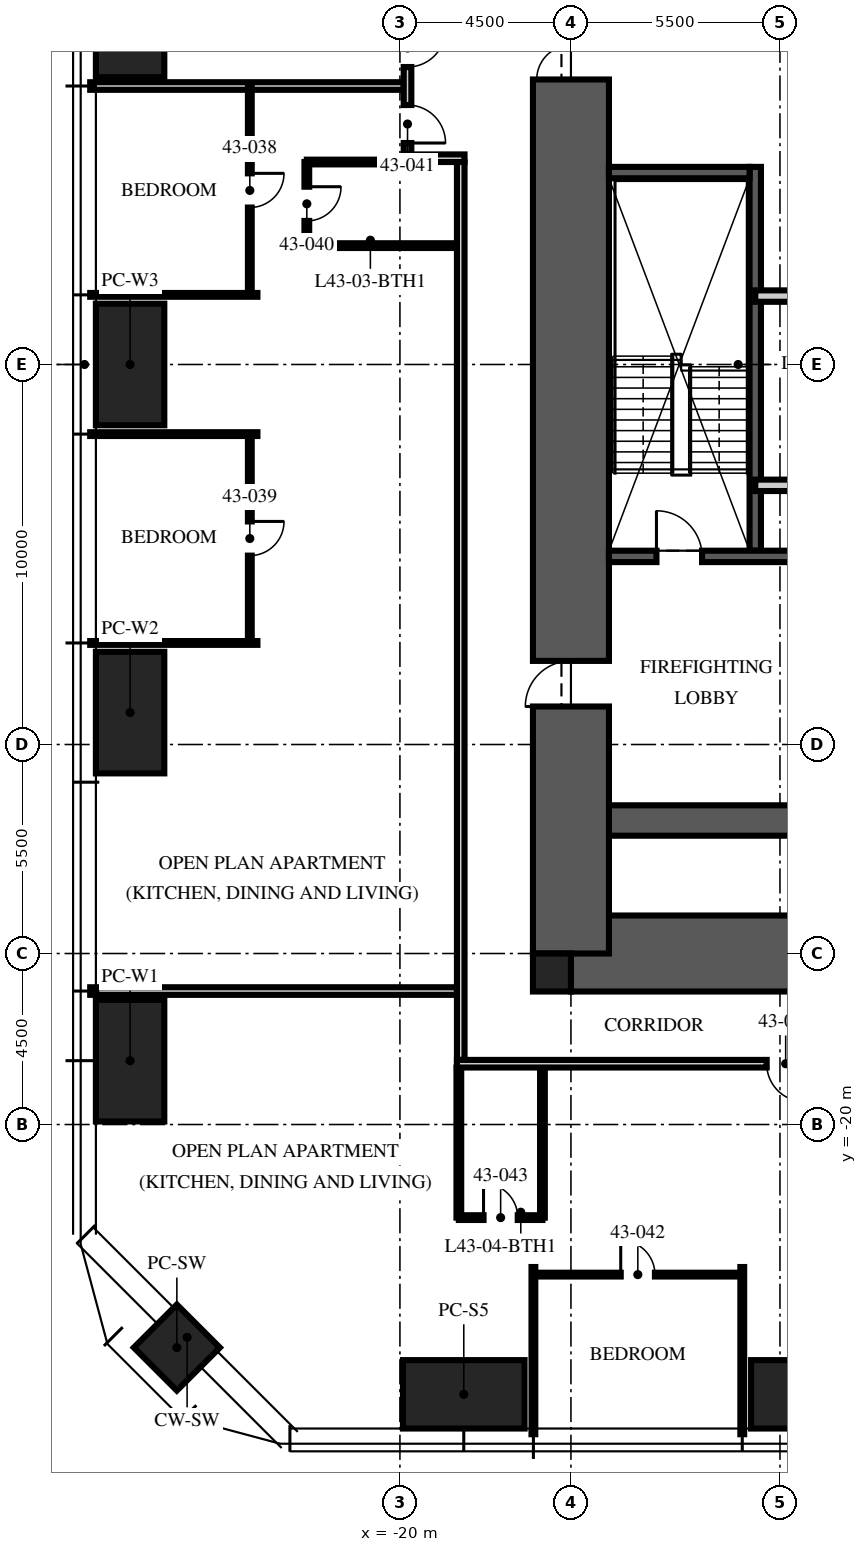
"""IFC4 building model, lengths in metres.
Left out: names, types, materials, properties, quantities, classifications, styles, units other than length and angle.
Written with IfcOpenShell. Run it as: python <this file> out.ifc"""

import sys

from ifc_helpers import new_model, si_unit, direction, frame, frame_2d, origin, origin_2d, place, context, subcontext, project, spatial, rectangle, hollow_rectangle, extrude, element, fill, save


model = new_model("IFC4")
c1 = context("Model", 3, precision=1e-05, world=origin(), true_north=direction((0.0, 1.0)))
c2 = subcontext(c1, "Body", "Model", "MODEL_VIEW")
j1 = project(units=[si_unit("LENGTHUNIT", "METRE"), si_unit("PLANEANGLEUNIT", "RADIAN")], contexts=[c1])
p1 = place(None, origin())
s1 = spatial("IfcSite", under=j1, at=p1, CompositionType="ELEMENT")
p2 = place(p1, origin())
s2 = spatial("IfcBuilding", under=s1, at=p2, CompositionType="ELEMENT")
p3 = place(p2, frame((0.0, 0.0, 171.0)))
s3 = spatial("IfcBuildingStorey", under=s2, at=p3, CompositionType="ELEMENT", Elevation=171.0)
p4 = place(p3, frame((-15.5, -15.5, -0.25), z_axis=(0.0, 0.0, 1.0), x_axis=(1.0, 0.0, 0.0)))
e1 = element("IfcWall", 1, at=p4, inside=s3, PredefinedType="SHEAR", context=c2, shape_type="SweptSolid", body=[
    extrude(rectangle(XDim=31.0, YDim=2.0, at=frame_2d((15.5, 0.0))), origin(), (0.0, 0.0, 1.0), 3.75),
])
p5 = place(p4, frame((10.4, 0.0, 0.25)))
e2 = element("IfcOpeningElement", 2, at=p5, cuts=e1, PredefinedType="OPENING", context=c2, shape_type="SweptSolid", body=[
    extrude(rectangle(XDim=1.1, YDim=2.1, at=frame_2d((0.55, 1.05))), frame((0.0, 1.01, 0.0), z_axis=(0.0, -1.0, 0.0), x_axis=(1.0, 0.0, 0.0)), (0.0, 0.0, 1.0), 2.02),
])
p6 = place(p4, frame((13.5, 0.0, 0.25)))
e3 = element("IfcOpeningElement", 3, at=p6, cuts=e1, PredefinedType="OPENING", context=c2, shape_type="SweptSolid", body=[
    extrude(rectangle(XDim=1.1, YDim=2.1, at=frame_2d((0.55, 1.05))), frame((0.0, 1.01, 0.0), z_axis=(0.0, -1.0, 0.0), x_axis=(1.0, 0.0, 0.0)), (0.0, 0.0, 1.0), 2.02),
])
p7 = place(p4, frame((16.6, 0.0, 0.25)))
e4 = element("IfcOpeningElement", 4, at=p7, cuts=e1, PredefinedType="OPENING", context=c2, shape_type="SweptSolid", body=[
    extrude(rectangle(XDim=1.1, YDim=2.1, at=frame_2d((0.55, 1.05))), frame((0.0, 1.01, 0.0), z_axis=(0.0, -1.0, 0.0), x_axis=(1.0, 0.0, 0.0)), (0.0, 0.0, 1.0), 2.02),
])
p8 = place(p3, frame((-15.5, -12.0, -0.25), z_axis=(0.0, 0.0, 1.0), x_axis=(1.0, 0.0, 0.0)))
e5 = element("IfcWall", 5, at=p8, inside=s3, PredefinedType="SHEAR", context=c2, shape_type="SweptSolid", body=[
    extrude(rectangle(XDim=31.0, YDim=0.8, at=frame_2d((15.5, 0.0))), origin(), (0.0, 0.0, 1.0), 3.75),
])
p9 = place(p3, frame((-15.5, -15.5, -0.25), z_axis=(0.0, 0.0, 1.0), x_axis=(0.0, 1.0, 0.0)))
e6 = element("IfcWall", 6, at=p9, inside=s3, PredefinedType="SHEAR", context=c2, shape_type="SweptSolid", body=[
    extrude(rectangle(XDim=31.0, YDim=2.0, at=frame_2d((15.5, 0.0))), origin(), (0.0, 0.0, 1.0), 3.75),
])
p10 = place(p9, frame((6.5, 0.0, 0.25)))
e7 = element("IfcOpeningElement", 7, at=p10, cuts=e6, PredefinedType="OPENING", context=c2, shape_type="SweptSolid", body=[
    extrude(rectangle(XDim=1.2, YDim=2.1, at=frame_2d((0.6, 1.05))), frame((0.0, 1.01, 0.0), z_axis=(0.0, -1.0, 0.0), x_axis=(1.0, 0.0, 0.0)), (0.0, 0.0, 1.0), 2.02),
])
p11 = place(p9, frame((23.0, 0.0, 0.25)))
e8 = element("IfcOpeningElement", 8, at=p11, cuts=e6, PredefinedType="OPENING", context=c2, shape_type="SweptSolid", body=[
    extrude(rectangle(XDim=1.8, YDim=2.1, at=frame_2d((0.9, 1.05))), frame((0.0, 1.01, 0.0), z_axis=(0.0, -1.0, 0.0), x_axis=(1.0, 0.0, 0.0)), (0.0, 0.0, 1.0), 2.02),
])
p12 = place(p3, frame((-16.0, -16.0, -0.25), z_axis=(0.0, 0.0, 1.0), x_axis=(1.0, 0.0, 0.0)))
e9 = element("IfcColumn", 9, at=p12, inside=s3, PredefinedType="COLUMN", context=c2, shape_type="SweptSolid", body=[
    extrude(rectangle(XDim=1.0, YDim=1.0, at=origin_2d()), origin(), (0.0, 0.0, 1.0), 3.75),
])
for number, where, z_axis, x_axis in (
    (10, (-9.16, -27.1, 0.0), (0.0, 0.0, 1.0), (1.0, 0.0, 0.0)),
    (11, (-18.32, -27.1, 0.0), (0.0, 0.0, 1.0), (1.0, 0.0, 0.0)),
    (12, (-27.1, -18.32, 0.0), (0.0, 0.0, 1.0), (0.0, 1.0, 0.0)),
    (13, (-27.1, -9.16, 0.0), (0.0, 0.0, 1.0), (0.0, 1.0, 0.0)),
    (14, (-27.1, 0.0, 0.0), (0.0, 0.0, 1.0), (0.0, 1.0, 0.0)),
    (15, (-27.1, 9.16, 0.0), (0.0, 0.0, 1.0), (0.0, 1.0, 0.0)),
):
    element("IfcColumn", number, at=place(p3, frame(where, z_axis=z_axis, x_axis=x_axis)), inside=s3, PredefinedType="COLUMN", context=c2, shape_type="SweptSolid", body=[
        extrude(hollow_rectangle(XDim=3.2, YDim=1.8, WallThickness=0.2, at=origin_2d()), origin(), (0.0, 0.0, 1.0), 3.75),
    ])
p13 = place(p3, frame((-25.87, -25.87, 0.0), z_axis=(0.0, 0.0, 1.0), x_axis=(0.707106781187, -0.707106781187, 0.0)))
e16 = element("IfcColumn", 16, at=p13, inside=s3, PredefinedType="COLUMN", context=c2, shape_type="SweptSolid", body=[
    extrude(hollow_rectangle(XDim=1.6, YDim=1.6, WallThickness=0.1, at=origin_2d()), origin(), (0.0, 0.0, 1.0), 3.75),
])
p14 = place(p3, frame((-10.65, -4.9, 0.0), z_axis=(0.0, 0.0, 1.0), x_axis=(0.0, 1.0, 0.0)))
e17 = element("IfcWall", 17, at=p14, inside=s3, PredefinedType="SOLIDWALL", context=c2, shape_type="SweptSolid", body=[
    extrude(rectangle(XDim=10.1, YDim=0.3, at=frame_2d((5.05, 0.0))), origin(), (0.0, 0.0, 1.0), 3.5),
])
p15 = place(p3, frame((-14.5, -5.05, 0.0), z_axis=(0.0, 0.0, 1.0), x_axis=(1.0, 0.0, 0.0)))
e18 = element("IfcWall", 18, at=p15, inside=s3, PredefinedType="SOLIDWALL", context=c2, shape_type="SweptSolid", body=[
    extrude(rectangle(XDim=5.7, YDim=0.3, at=frame_2d((2.85, 0.0))), origin(), (0.0, 0.0, 1.0), 3.5),
])
p16 = place(p15, frame((1.25, 0.0, 0.0)))
e19 = element("IfcOpeningElement", 19, at=p16, cuts=e18, PredefinedType="OPENING", context=c2, shape_type="SweptSolid", body=[
    extrude(rectangle(XDim=1.2, YDim=2.1, at=frame_2d((0.6, 1.05))), frame((0.0, 0.16, 0.0), z_axis=(0.0, -1.0, 0.0), x_axis=(1.0, 0.0, 0.0)), (0.0, 0.0, 1.0), 0.32),
])
p17 = place(p3, frame((-14.5, 5.05, 0.0), z_axis=(0.0, 0.0, 1.0), x_axis=(1.0, 0.0, 0.0)))
e20 = element("IfcWall", 20, at=p17, inside=s3, PredefinedType="SOLIDWALL", context=c2, shape_type="SweptSolid", body=[
    extrude(rectangle(XDim=3.7, YDim=0.3, at=frame_2d((1.85, 0.0))), origin(), (0.0, 0.0, 1.0), 3.5),
])
p18 = place(p3, frame((-10.65, 1.8, 0.0), z_axis=(0.0, 0.0, 1.0), x_axis=(1.0, 0.0, 0.0)))
e21 = element("IfcWall", 21, at=p18, inside=s3, PredefinedType="PARTITIONING", context=c2, shape_type="SweptSolid", body=[
    extrude(rectangle(XDim=21.3, YDim=0.3, at=frame_2d((10.65, 0.0))), origin(), (0.0, 0.0, 1.0), 3.5),
])
p19 = place(p18, frame((10.05, 0.0, 0.0)))
e22 = element("IfcOpeningElement", 22, at=p19, cuts=e21, PredefinedType="OPENING", context=c2, shape_type="SweptSolid", body=[
    extrude(rectangle(XDim=1.2, YDim=2.1, at=frame_2d((0.6, 1.05))), frame((0.0, 0.16, 0.0), z_axis=(0.0, -1.0, 0.0), x_axis=(1.0, 0.0, 0.0)), (0.0, 0.0, 1.0), 0.32),
])
p20 = place(p18, frame((19.238, 0.0, 0.0)))
e23 = element("IfcOpeningElement", 23, at=p20, cuts=e21, PredefinedType="OPENING", context=c2, shape_type="SweptSolid", body=[
    extrude(rectangle(XDim=0.9, YDim=2.1, at=frame_2d((0.45, 1.05))), frame((0.0, 0.16, 0.0), z_axis=(0.0, -1.0, 0.0), x_axis=(1.0, 0.0, 0.0)), (0.0, 0.0, 1.0), 0.32),
])
p21 = place(p3, frame((-10.65, -3.18, 0.0), z_axis=(0.0, 0.0, 1.0), x_axis=(1.0, 0.0, 0.0)))
e24 = element("IfcWall", 24, at=p21, inside=s3, PredefinedType="PARTITIONING", context=c2, shape_type="SweptSolid", body=[
    extrude(rectangle(XDim=6.45, YDim=0.3, at=frame_2d((3.225, 0.0))), origin(), (0.0, 0.0, 1.0), 3.5),
])
p22 = place(p3, frame((-19.9, 7.328, 0.0), z_axis=(0.0, 0.0, 1.0), x_axis=(-1.0, 0.0, 0.0)))
e25 = element("IfcWall", 25, at=p22, inside=s3, PredefinedType="PARTITIONING", context=c2, shape_type="SweptSolid", body=[
    extrude(rectangle(XDim=8.25, YDim=0.2, at=frame_2d((4.125, 0.0))), origin(), (0.0, 0.0, 1.0), 2.81),
])
for number, where, z_axis, x_axis in (
    (26, (-23.75, 1.832, 0.0), (0.0, 0.0, 1.0), (-1.0, 0.0, 0.0)),
    (27, (-23.75, -1.832, 0.0), (0.0, 0.0, 1.0), (-1.0, 0.0, 0.0)),
    (28, (-23.75, -7.328, 0.0), (0.0, 0.0, 1.0), (-1.0, 0.0, 0.0)),
):
    element("IfcWall", number, at=place(p3, frame(where, z_axis=z_axis, x_axis=x_axis)), inside=s3, PredefinedType="PARTITIONING", context=c2, shape_type="SweptSolid", body=[
        extrude(rectangle(XDim=4.4, YDim=0.1, at=frame_2d((2.2, 0.0))), origin(), (0.0, 0.0, 1.0), 2.81),
    ])
p23 = place(p3, frame((-18.5, -16.488, 0.0), z_axis=(0.0, 0.0, 1.0), x_axis=(-1.0, 0.0, 0.0)))
e29 = element("IfcWall", 29, at=p23, inside=s3, PredefinedType="PARTITIONING", context=c2, shape_type="SweptSolid", body=[
    extrude(rectangle(XDim=9.65, YDim=0.2, at=frame_2d((4.825, 0.0))), origin(), (0.0, 0.0, 1.0), 2.81),
])
for number, where, z_axis, x_axis in (
    (30, (-16.488, -23.75, 0.0), (0.0, 0.0, 1.0), (0.0, -1.0, 0.0)),
    (31, (-10.992, -23.75, 0.0), (0.0, 0.0, 1.0), (0.0, -1.0, 0.0)),
):
    element("IfcWall", number, at=place(p3, frame(where, z_axis=z_axis, x_axis=x_axis)), inside=s3, PredefinedType="PARTITIONING", context=c2, shape_type="SweptSolid", body=[
        extrude(rectangle(XDim=4.4, YDim=0.1, at=frame_2d((2.2, 0.0))), origin(), (0.0, 0.0, 1.0), 2.81),
    ])
p24 = place(p3, frame((-23.95, 7.328, 0.0), z_axis=(0.0, 0.0, 1.0), x_axis=(0.0, -1.0, 0.0)))
e32 = element("IfcWall", 32, at=p24, inside=s3, PredefinedType="PARTITIONING", context=c2, shape_type="SweptSolid", body=[
    extrude(rectangle(XDim=5.496, YDim=0.1, at=frame_2d((2.748, 0.0))), origin(), (0.0, 0.0, 1.0), 2.81),
])
p25 = place(p24, frame((2.298, 0.0, 0.0)))
e33 = element("IfcOpeningElement", 33, at=p25, cuts=e32, PredefinedType="OPENING", context=c2, shape_type="SweptSolid", body=[
    extrude(rectangle(XDim=0.9, YDim=2.1, at=frame_2d((0.45, 1.05))), frame((0.0, 0.06, 0.0), z_axis=(0.0, -1.0, 0.0), x_axis=(1.0, 0.0, 0.0)), (0.0, 0.0, 1.0), 0.12),
])
p26 = place(p3, frame((-23.95, -1.832, 0.0), z_axis=(0.0, 0.0, 1.0), x_axis=(0.0, -1.0, 0.0)))
e34 = element("IfcWall", 34, at=p26, inside=s3, PredefinedType="PARTITIONING", context=c2, shape_type="SweptSolid", body=[
    extrude(rectangle(XDim=5.496, YDim=0.1, at=frame_2d((2.748, 0.0))), origin(), (0.0, 0.0, 1.0), 2.81),
])
p27 = place(p26, frame((2.298, 0.0, 0.0)))
e35 = element("IfcOpeningElement", 35, at=p27, cuts=e34, PredefinedType="OPENING", context=c2, shape_type="SweptSolid", body=[
    extrude(rectangle(XDim=0.9, YDim=2.1, at=frame_2d((0.45, 1.05))), frame((0.0, 0.06, 0.0), z_axis=(0.0, -1.0, 0.0), x_axis=(1.0, 0.0, 0.0)), (0.0, 0.0, 1.0), 0.12),
])
p28 = place(p3, frame((-22.45, 5.328, 0.0), z_axis=(0.0, 0.0, 1.0), x_axis=(0.0, -1.0, 0.0)))
e36 = element("IfcWall", 36, at=p28, inside=s3, PredefinedType="PARTITIONING", context=c2, shape_type="SweptSolid", body=[
    extrude(rectangle(XDim=2.2, YDim=0.125, at=frame_2d((1.1, 0.0))), origin(), (0.0, 0.0, 1.0), 2.81),
])
p29 = place(p28, frame((0.65, 0.0, 0.0)))
e37 = element("IfcOpeningElement", 37, at=p29, cuts=e36, PredefinedType="OPENING", context=c2, shape_type="SweptSolid", body=[
    extrude(rectangle(XDim=0.9, YDim=2.1, at=frame_2d((0.45, 1.05))), frame((0.0, 0.073, 0.0), z_axis=(0.0, -1.0, 0.0), x_axis=(1.0, 0.0, 0.0)), (0.0, 0.0, 1.0), 0.145),
])
p30 = place(p3, frame((-19.97, 5.328, 0.0), z_axis=(0.0, 0.0, 1.0), x_axis=(-1.0, 0.0, 0.0)))
e38 = element("IfcWall", 38, at=p30, inside=s3, PredefinedType="PARTITIONING", context=c2, shape_type="SweptSolid", body=[
    extrude(rectangle(XDim=2.48, YDim=0.125, at=frame_2d((1.24, 0.0))), origin(), (0.0, 0.0, 1.0), 3.5),
])
p31 = place(p3, frame((-18.5, 3.128, 0.0), z_axis=(0.0, 0.0, 1.0), x_axis=(-1.0, 0.0, 0.0)))
e39 = element("IfcWall", 39, at=p31, inside=s3, PredefinedType="PARTITIONING", context=c2, shape_type="SweptSolid", body=[
    extrude(rectangle(XDim=3.95, YDim=0.125, at=frame_2d((1.975, 0.0))), origin(), (0.0, 0.0, 1.0), 3.5),
])
p32 = place(p3, frame((-16.488, -23.95, 0.0), z_axis=(0.0, 0.0, 1.0), x_axis=(1.0, 0.0, 0.0)))
e40 = element("IfcWall", 40, at=p32, inside=s3, PredefinedType="PARTITIONING", context=c2, shape_type="SweptSolid", body=[
    extrude(rectangle(XDim=5.496, YDim=0.1, at=frame_2d((2.748, 0.0))), origin(), (0.0, 0.0, 1.0), 2.81),
])
p33 = place(p32, frame((2.298, 0.0, 0.0)))
e41 = element("IfcOpeningElement", 41, at=p33, cuts=e40, PredefinedType="OPENING", context=c2, shape_type="SweptSolid", body=[
    extrude(rectangle(XDim=0.9, YDim=2.1, at=frame_2d((0.45, 1.05))), frame((0.0, 0.06, 0.0), z_axis=(0.0, -1.0, 0.0), x_axis=(1.0, 0.0, 0.0)), (0.0, 0.0, 1.0), 0.12),
])
p34 = place(p3, frame((-18.45, -22.45, 0.0), z_axis=(0.0, 0.0, 1.0), x_axis=(1.0, 0.0, 0.0)))
e42 = element("IfcWall", 42, at=p34, inside=s3, PredefinedType="PARTITIONING", context=c2, shape_type="SweptSolid", body=[
    extrude(rectangle(XDim=2.2, YDim=0.125, at=frame_2d((1.1, 0.0))), origin(), (0.0, 0.0, 1.0), 2.7),
])
p35 = place(p34, frame((0.65, 0.0, 0.0)))
e43 = element("IfcOpeningElement", 43, at=p35, cuts=e42, PredefinedType="OPENING", context=c2, shape_type="SweptSolid", body=[
    extrude(rectangle(XDim=0.9, YDim=2.1, at=frame_2d((0.45, 1.05))), frame((0.0, 0.073, 0.0), z_axis=(0.0, -1.0, 0.0), x_axis=(1.0, 0.0, 0.0)), (0.0, 0.0, 1.0), 0.145),
])
p36 = place(p3, frame((-18.45, -18.5, 0.0), z_axis=(0.0, 0.0, 1.0), x_axis=(0.0, -1.0, 0.0)))
e44 = element("IfcWall", 44, at=p36, inside=s3, PredefinedType="PARTITIONING", context=c2, shape_type="SweptSolid", body=[
    extrude(rectangle(XDim=3.95, YDim=0.125, at=frame_2d((1.975, 0.0))), origin(), (0.0, 0.0, 1.0), 2.3),
])
p37 = place(p3, frame((-16.25, -18.5, 0.0), z_axis=(0.0, 0.0, 1.0), x_axis=(0.0, -1.0, 0.0)))
e45 = element("IfcWall", 45, at=p37, inside=s3, PredefinedType="PARTITIONING", context=c2, shape_type="SweptSolid", body=[
    extrude(rectangle(XDim=3.95, YDim=0.125, at=frame_2d((1.975, 0.0))), origin(), (0.0, 0.0, 1.0), 3.5),
])
p38 = place(p3, frame((-18.3, 5.428, 0.0), z_axis=(0.0, 0.0, 1.0), x_axis=(-1.0, 0.0, 0.0)))
e46 = element("IfcWall", 46, at=p38, inside=s3, PredefinedType="PARTITIONING", context=c2, shape_type="SweptSolid", body=[
    extrude(rectangle(XDim=1.6, YDim=0.2, at=frame_2d((0.8, 0.0))), origin(), (0.0, 0.0, 1.0), 3.5),
])
p39 = place(p3, frame((-19.8, 9.128, 0.0), z_axis=(0.0, 0.0, 1.0), x_axis=(0.0, -1.0, 0.0)))
e47 = element("IfcWall", 47, at=p39, inside=s3, PredefinedType="PARTITIONING", context=c2, shape_type="SweptSolid", body=[
    extrude(rectangle(XDim=3.6, YDim=0.2, at=frame_2d((1.8, 0.0))), origin(), (0.0, 0.0, 1.0), 2.7),
])
p40 = place(p39, frame((0.3, 0.0, 0.0)))
e48 = element("IfcOpeningElement", 48, at=p40, cuts=e47, PredefinedType="OPENING", context=c2, shape_type="SweptSolid", body=[
    extrude(rectangle(XDim=1.0, YDim=2.2, at=frame_2d((0.5, 1.1))), frame((0.0, 0.11, 0.0), z_axis=(0.0, -1.0, 0.0), x_axis=(1.0, 0.0, 0.0)), (0.0, 0.0, 1.0), 0.22),
])
p41 = place(p39, frame((2.3, 0.0, 0.0)))
e49 = element("IfcOpeningElement", 49, at=p41, cuts=e47, PredefinedType="OPENING", context=c2, shape_type="SweptSolid", body=[
    extrude(rectangle(XDim=1.0, YDim=2.2, at=frame_2d((0.5, 1.1))), frame((0.0, 0.11, 0.0), z_axis=(0.0, -1.0, 0.0), x_axis=(1.0, 0.0, 0.0)), (0.0, 0.0, 1.0), 0.22),
])
p42 = place(p3, frame((-18.4, 5.328, 0.0), z_axis=(0.0, 0.0, 1.0), x_axis=(0.0, -1.0, 0.0)))
e50 = element("IfcWall", 50, at=p42, inside=s3, PredefinedType="PARTITIONING", context=c2, shape_type="SweptSolid", body=[
    extrude(rectangle(XDim=23.628, YDim=0.2, at=frame_2d((11.814, 0.0))), origin(), (0.0, 0.0, 1.0), 2.3),
])
p43 = place(p3, frame((-8.6, -18.4, 0.0), z_axis=(0.0, 0.0, 1.0), x_axis=(-1.0, 0.0, 0.0)))
e51 = element("IfcWall", 51, at=p43, inside=s3, PredefinedType="PARTITIONING", context=c2, shape_type="SweptSolid", body=[
    extrude(rectangle(XDim=9.9, YDim=0.2, at=frame_2d((4.95, 0.0))), origin(), (0.0, 0.0, 1.0), 2.3),
])
p44 = place(p43, frame((0.75, 0.0, 0.0)))
e52 = element("IfcOpeningElement", 52, at=p44, cuts=e51, PredefinedType="OPENING", context=c2, shape_type="SweptSolid", body=[
    extrude(rectangle(XDim=1.0, YDim=2.2, at=frame_2d((0.5, 1.1))), frame((0.0, 0.11, 0.0), z_axis=(0.0, -1.0, 0.0), x_axis=(1.0, 0.0, 0.0)), (0.0, 0.0, 1.0), 0.22),
])
p45 = place(p16, origin())
e53 = element("IfcDoor", 53, at=p45, inside=s3, OperationType="SINGLE_SWING_LEFT", PredefinedType="DOOR", context=c2, shape_type="SweptSolid", body=[
    extrude(rectangle(XDim=1.2, YDim=2.1, at=frame_2d((0.6, 1.05))), frame((0.0, 0.025, 0.0), z_axis=(0.0, -1.0, 0.0), x_axis=(1.0, 0.0, 0.0)), (0.0, 0.0, 1.0), 0.05),
])
fill(e19, e53)
p46 = place(p10, origin())
e54 = element("IfcDoor", 54, at=p46, inside=s3, OperationType="SINGLE_SWING_LEFT", PredefinedType="DOOR", context=c2, shape_type="SweptSolid", body=[
    extrude(rectangle(XDim=1.2, YDim=2.1, at=frame_2d((0.6, 1.05))), frame((0.0, 0.025, 0.0), z_axis=(0.0, -1.0, 0.0), x_axis=(1.0, 0.0, 0.0)), (0.0, 0.0, 1.0), 0.05),
])
fill(e7, e54)
p47 = place(p11, origin())
e55 = element("IfcDoor", 55, at=p47, inside=s3, OperationType="DOUBLE_DOOR_SINGLE_SWING", PredefinedType="DOOR", context=c2, shape_type="SweptSolid", body=[
    extrude(rectangle(XDim=1.8, YDim=2.1, at=frame_2d((0.9, 1.05))), frame((0.0, 0.025, 0.0), z_axis=(0.0, -1.0, 0.0), x_axis=(1.0, 0.0, 0.0)), (0.0, 0.0, 1.0), 0.05),
])
fill(e8, e55)
p48 = place(p40, origin())
e56 = element("IfcDoor", 56, at=p48, inside=s3, OperationType="SINGLE_SWING_LEFT", PredefinedType="DOOR", context=c2, shape_type="SweptSolid", body=[
    extrude(rectangle(XDim=1.0, YDim=2.2, at=frame_2d((0.5, 1.1))), frame((0.0, 0.025, 0.0), z_axis=(0.0, -1.0, 0.0), x_axis=(1.0, 0.0, 0.0)), (0.0, 0.0, 1.0), 0.05),
])
fill(e48, e56)
p49 = place(p25, origin())
e57 = element("IfcDoor", 57, at=p49, inside=s3, OperationType="SINGLE_SWING_LEFT", PredefinedType="DOOR", context=c2, shape_type="SweptSolid", body=[
    extrude(rectangle(XDim=0.9, YDim=2.1, at=frame_2d((0.45, 1.05))), frame((0.0, 0.025, 0.0), z_axis=(0.0, -1.0, 0.0), x_axis=(1.0, 0.0, 0.0)), (0.0, 0.0, 1.0), 0.05),
])
fill(e33, e57)
p50 = place(p27, origin())
e58 = element("IfcDoor", 58, at=p50, inside=s3, OperationType="SINGLE_SWING_LEFT", PredefinedType="DOOR", context=c2, shape_type="SweptSolid", body=[
    extrude(rectangle(XDim=0.9, YDim=2.1, at=frame_2d((0.45, 1.05))), frame((0.0, 0.025, 0.0), z_axis=(0.0, -1.0, 0.0), x_axis=(1.0, 0.0, 0.0)), (0.0, 0.0, 1.0), 0.05),
])
fill(e35, e58)
p51 = place(p29, origin())
e59 = element("IfcDoor", 59, at=p51, inside=s3, OperationType="SINGLE_SWING_LEFT", PredefinedType="DOOR", context=c2, shape_type="SweptSolid", body=[
    extrude(rectangle(XDim=0.9, YDim=2.1, at=frame_2d((0.45, 1.05))), frame((0.0, 0.025, 0.0), z_axis=(0.0, -1.0, 0.0), x_axis=(1.0, 0.0, 0.0)), (0.0, 0.0, 1.0), 0.05),
])
fill(e37, e59)
p52 = place(p41, origin())
e60 = element("IfcDoor", 60, at=p52, inside=s3, OperationType="SINGLE_SWING_RIGHT", PredefinedType="DOOR", context=c2, shape_type="SweptSolid", body=[
    extrude(rectangle(XDim=1.0, YDim=2.2, at=frame_2d((0.5, 1.1))), frame((0.0, 0.025, 0.0), z_axis=(0.0, -1.0, 0.0), x_axis=(1.0, 0.0, 0.0)), (0.0, 0.0, 1.0), 0.05),
])
fill(e49, e60)
p53 = place(p33, origin())
e61 = element("IfcDoor", 61, at=p53, inside=s3, OperationType="SINGLE_SWING_LEFT", PredefinedType="DOOR", context=c2, shape_type="SweptSolid", body=[
    extrude(rectangle(XDim=0.9, YDim=2.1, at=frame_2d((0.45, 1.05))), frame((0.0, 0.025, 0.0), z_axis=(0.0, -1.0, 0.0), x_axis=(1.0, 0.0, 0.0)), (0.0, 0.0, 1.0), 0.05),
])
fill(e41, e61)
p54 = place(p35, origin())
e62 = element("IfcDoor", 62, at=p54, inside=s3, OperationType="SINGLE_SWING_LEFT", PredefinedType="DOOR", context=c2, shape_type="SweptSolid", body=[
    extrude(rectangle(XDim=0.9, YDim=2.1, at=frame_2d((0.45, 1.05))), frame((0.0, 0.025, 0.0), z_axis=(0.0, -1.0, 0.0), x_axis=(1.0, 0.0, 0.0)), (0.0, 0.0, 1.0), 0.05),
])
fill(e43, e62)
p55 = place(p44, origin())
e63 = element("IfcDoor", 63, at=p55, inside=s3, OperationType="SINGLE_SWING_LEFT", PredefinedType="DOOR", context=c2, shape_type="SweptSolid", body=[
    extrude(rectangle(XDim=1.0, YDim=2.2, at=frame_2d((0.5, 1.1))), frame((0.0, 0.025, 0.0), z_axis=(0.0, -1.0, 0.0), x_axis=(1.0, 0.0, 0.0)), (0.0, 0.0, 1.0), 0.05),
])
fill(e52, e63)
save(model, sys.argv[1])
